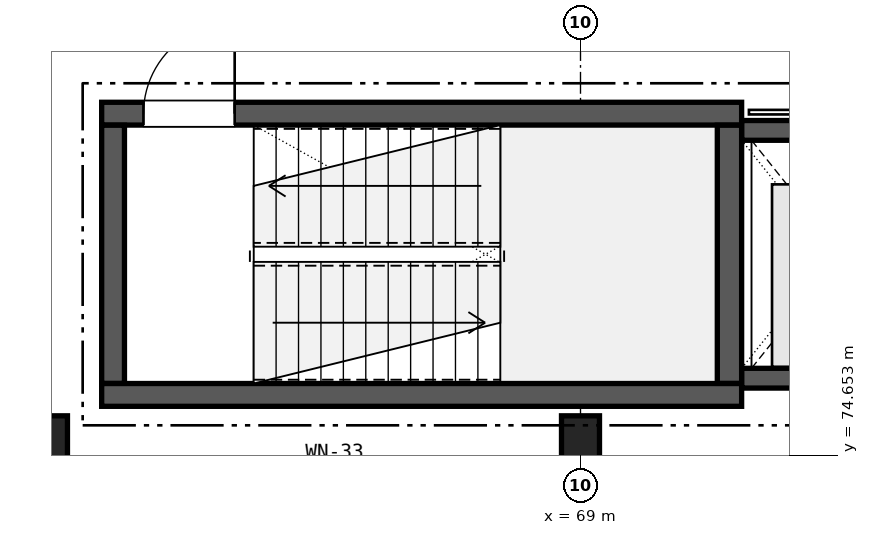
"""IFC4 building model, lengths in metres.
Left out: names, types, materials, properties, quantities, classifications, styles, units other than length and angle.
Written with IfcOpenShell. Run it as: python <this file> out.ifc"""

import sys

from ifc_helpers import new_model, si_unit, direction, frame, frame_2d, origin, origin_2d, place, context, subcontext, project, spatial, rectangle, extrude, element, fill, save


model = new_model("IFC4")
c1 = context("Model", 3, precision=1e-05, world=origin(), true_north=direction((0.0, 1.0)))
c2 = subcontext(c1, "Body", "Model", "MODEL_VIEW")
j1 = project(units=[si_unit("LENGTHUNIT", "METRE"), si_unit("PLANEANGLEUNIT", "RADIAN")], contexts=[c1])
p1 = place(None, origin())
s1 = spatial("IfcSite", under=j1, at=p1, CompositionType="ELEMENT")
p2 = place(p1, origin())
s2 = spatial("IfcBuilding", under=s1, at=p2, CompositionType="ELEMENT")
p3 = place(p2, frame((0.0, 0.0, 13.6)))
s3 = spatial("IfcBuildingStorey", under=s2, at=p3, CompositionType="ELEMENT", Elevation=13.6)
for number, where, z_axis, x_axis in (
    (1, (62.0, 74.8, 0.0), (0.0, 0.0, 1.0), (1.0, 0.0, 0.0)),
    (2, (69.0, 74.8, 0.0), (0.0, 0.0, 1.0), (1.0, 0.0, 0.0)),
):
    element("IfcColumn", number, at=place(p3, frame(where, z_axis=z_axis, x_axis=x_axis)), inside=s3, PredefinedType="COLUMN", context=c2, shape_type="SweptSolid", body=[
        extrude(rectangle(XDim=0.5, YDim=0.75, at=origin_2d()), origin(), (0.0, 0.0, 1.0), 4.08),
    ])
p4 = place(p3, frame((62.7, 75.45, 0.0), z_axis=(0.0, 0.0, 1.0), x_axis=(1.0, 0.0, 0.0)))
e3 = element("IfcWall", 3, at=p4, inside=s3, PredefinedType="SHEAR", context=c2, shape_type="SweptSolid", body=[
    extrude(rectangle(XDim=8.42, YDim=0.3, at=frame_2d((4.21, 0.0))), origin(), (0.0, 0.0, 1.0), 3.775),
])
p5 = place(p3, frame((62.7, 79.15, 0.0), z_axis=(0.0, 0.0, 1.0), x_axis=(1.0, 0.0, 0.0)))
e4 = element("IfcWall", 4, at=p5, inside=s3, PredefinedType="SHEAR", context=c2, shape_type="SweptSolid", body=[
    extrude(rectangle(XDim=8.42, YDim=0.3, at=frame_2d((4.21, 0.0))), origin(), (0.0, 0.0, 1.0), 3.775),
])
p6 = place(p5, frame((0.55, 0.0, 0.0)))
e5 = element("IfcOpeningElement", 5, at=p6, cuts=e4, PredefinedType="OPENING", context=c2, shape_type="SweptSolid", body=[
    extrude(rectangle(XDim=1.2, YDim=2.2, at=frame_2d((0.6, 1.1))), frame((0.0, 0.16, 0.0), z_axis=(0.0, -1.0, 0.0), x_axis=(1.0, 0.0, 0.0)), (0.0, 0.0, 1.0), 0.32),
])
p7 = place(p3, frame((62.85, 75.602, 0.0), z_axis=(0.0, 0.0, 1.0), x_axis=(0.0, 1.0, 0.0)))
e6 = element("IfcWall", 6, at=p7, inside=s3, PredefinedType="SHEAR", context=c2, shape_type="SweptSolid", body=[
    extrude(rectangle(XDim=3.396, YDim=0.3, at=frame_2d((1.698, 0.0))), origin(), (0.0, 0.0, 1.0), 3.775),
])
p8 = place(p3, frame((70.96, 75.602, 0.0), z_axis=(0.0, 0.0, 1.0), x_axis=(0.0, 1.0, 0.0)))
e7 = element("IfcWall", 7, at=p8, inside=s3, PredefinedType="SHEAR", context=c2, shape_type="SweptSolid", body=[
    extrude(rectangle(XDim=3.396, YDim=0.32, at=frame_2d((1.698, 0.0))), origin(), (0.0, 0.0, 1.0), 3.775),
])
p9 = place(p3, frame((71.122, 75.67, 0.0), z_axis=(0.0, 0.0, 1.0), x_axis=(1.0, 0.0, 0.0)))
e8 = element("IfcWall", 8, at=p9, inside=s3, PredefinedType="SHEAR", context=c2, shape_type="SweptSolid", body=[
    extrude(rectangle(XDim=2.658, YDim=0.26, at=frame_2d((1.329, 0.0))), origin(), (0.0, 0.0, 1.0), 3.775),
])
p10 = place(p3, frame((71.122, 78.93, 0.0), z_axis=(0.0, 0.0, 1.0), x_axis=(1.0, 0.0, 0.0)))
e9 = element("IfcWall", 9, at=p10, inside=s3, PredefinedType="SHEAR", context=c2, shape_type="SweptSolid", body=[
    extrude(rectangle(XDim=2.658, YDim=0.26, at=frame_2d((1.329, 0.0))), origin(), (0.0, 0.0, 1.0), 3.775),
])
p11 = place(p10, frame((0.679, 0.0, 0.0)))
e10 = element("IfcOpeningElement", 10, at=p11, cuts=e9, PredefinedType="OPENING", context=c2, shape_type="SweptSolid", body=[
    extrude(rectangle(XDim=1.3, YDim=2.2, at=frame_2d((0.65, 1.1))), frame((0.0, 0.14, 0.0), z_axis=(0.0, -1.0, 0.0), x_axis=(1.0, 0.0, 0.0)), (0.0, 0.0, 1.0), 0.28),
])
p12 = place(p6, origin())
e11 = element("IfcDoor", 11, at=p12, inside=s3, OperationType="SINGLE_SWING_RIGHT", PredefinedType="DOOR", context=c2, shape_type="SweptSolid", body=[
    extrude(rectangle(XDim=1.2, YDim=2.2, at=frame_2d((0.6, 1.1))), frame((0.0, 0.025, 0.0), z_axis=(0.0, -1.0, 0.0), x_axis=(1.0, 0.0, 0.0)), (0.0, 0.0, 1.0), 0.05),
])
fill(e5, e11)
save(model, sys.argv[1])
